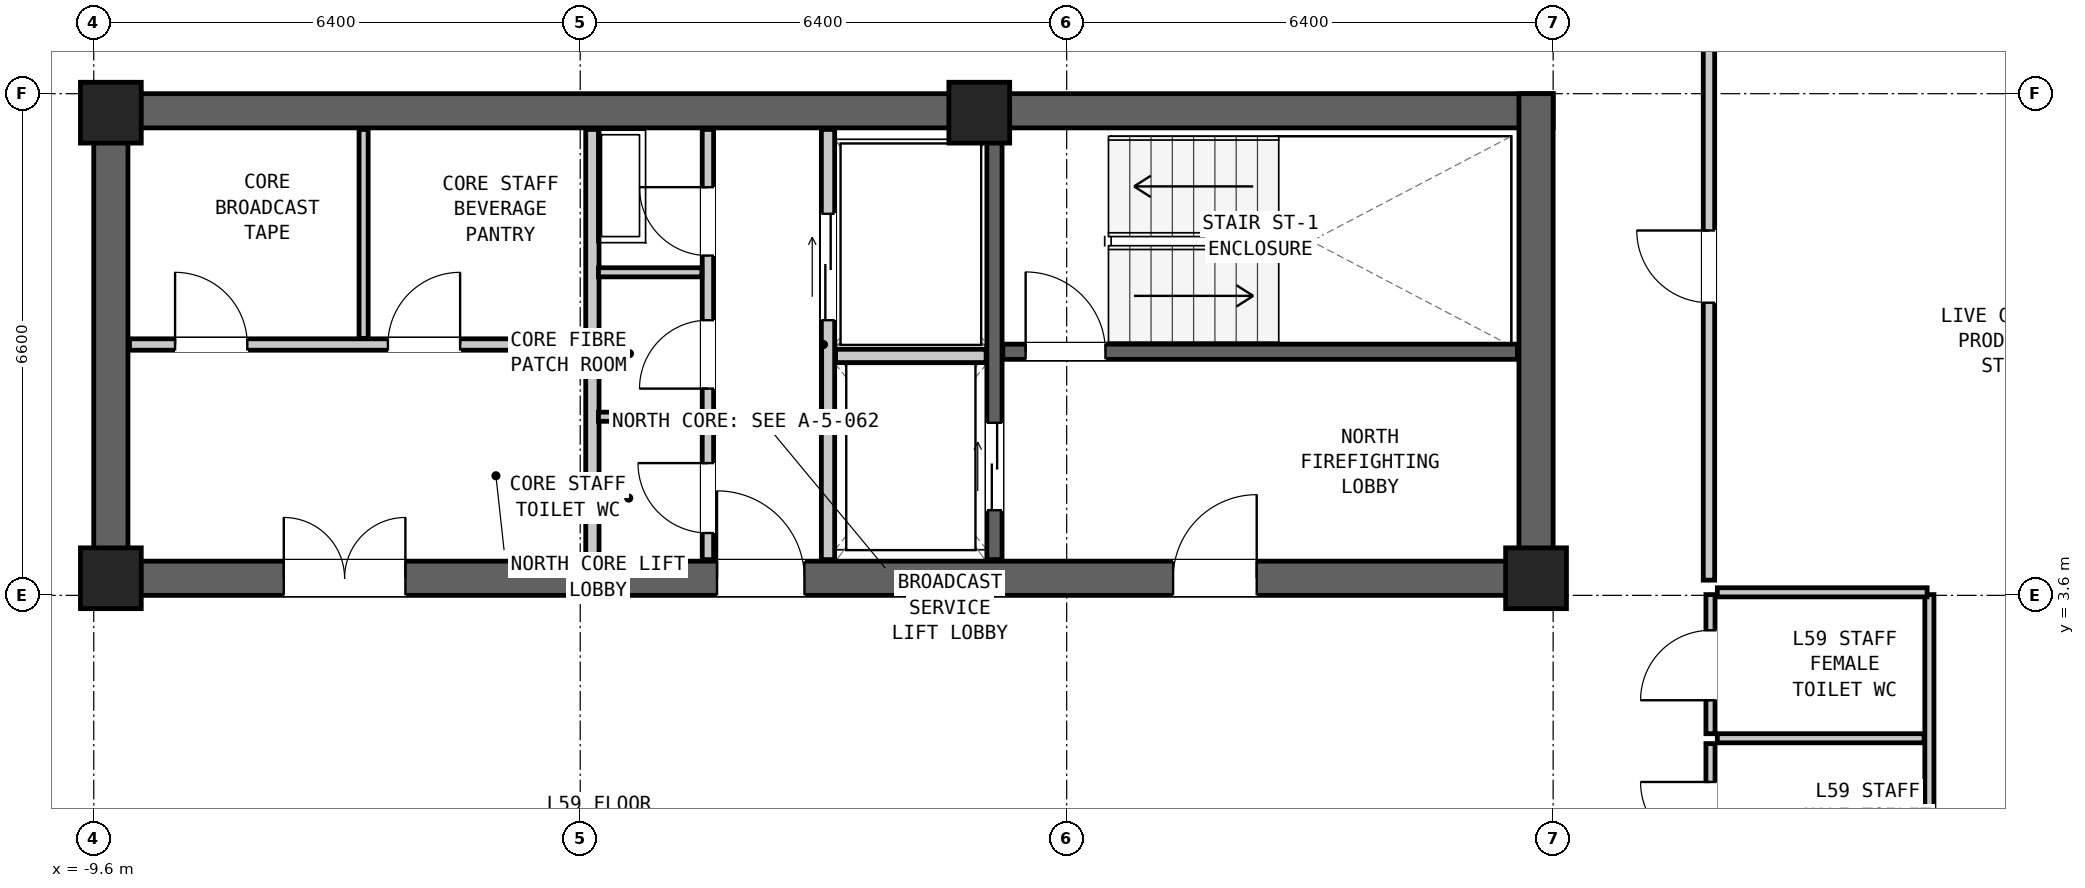
"""IFC4 building model, lengths in metres.
Left out: names, types, materials, properties, quantities, classifications, styles, units other than length and angle.
Written with IfcOpenShell. Run it as: python <this file> out.ifc"""

import sys

from ifc_helpers import new_model, si_unit, direction, frame, frame_2d, origin, origin_2d, place, context, subcontext, project, spatial, rectangle, extrude, element, fill, save


model = new_model("IFC4")
c1 = context("Model", 3, precision=1e-05, world=origin(), true_north=direction((0.0, 1.0)))
c2 = subcontext(c1, "Body", "Model", "MODEL_VIEW")
j1 = project(units=[si_unit("LENGTHUNIT", "METRE"), si_unit("PLANEANGLEUNIT", "RADIAN")], contexts=[c1])
p1 = place(None, origin())
s1 = spatial("IfcSite", under=j1, at=p1, CompositionType="ELEMENT")
p2 = place(p1, origin())
s2 = spatial("IfcBuilding", under=s1, at=p2, CompositionType="ELEMENT")
p3 = place(p2, frame((0.0, 0.0, 202.55)))
s3 = spatial("IfcBuildingStorey", under=s2, at=p3, CompositionType="ELEMENT", Elevation=202.55)
p4 = place(p3, frame((-9.6, 9.975, 0.0), z_axis=(0.0, 0.0, 1.0), x_axis=(1.0, 0.0, 0.0)))
e1 = element("IfcWall", 1, at=p4, inside=s3, PredefinedType="SHEAR", context=c2, shape_type="SweptSolid", body=[
    extrude(rectangle(XDim=19.2, YDim=0.45, at=frame_2d((9.6, 0.0))), origin(), (0.0, 0.0, 1.0), 3.05),
])
p5 = place(p3, frame((-9.6, 3.825, 0.0), z_axis=(0.0, 0.0, 1.0), x_axis=(1.0, 0.0, 0.0)))
e2 = element("IfcWall", 2, at=p5, inside=s3, PredefinedType="SHEAR", context=c2, shape_type="SweptSolid", body=[
    extrude(rectangle(XDim=19.2, YDim=0.45, at=frame_2d((9.6, 0.0))), origin(), (0.0, 0.0, 1.0), 3.05),
])
p6 = place(p5, frame((14.2, 0.0, 0.0)))
e3 = element("IfcOpeningElement", 3, at=p6, cuts=e2, PredefinedType="OPENING", context=c2, shape_type="SweptSolid", body=[
    extrude(rectangle(XDim=1.1, YDim=2.08, at=frame_2d((0.55, 1.04))), frame((0.0, 0.237, 0.0), z_axis=(0.0, -1.0, 0.0), x_axis=(1.0, 0.0, 0.0)), (0.0, 0.0, 1.0), 0.474),
])
p7 = place(p5, frame((8.2, 0.0, 0.0)))
e4 = element("IfcOpeningElement", 4, at=p7, cuts=e2, PredefinedType="OPENING", context=c2, shape_type="SweptSolid", body=[
    extrude(rectangle(XDim=1.15, YDim=2.1, at=frame_2d((0.575, 1.05))), frame((0.0, 0.237, 0.0), z_axis=(0.0, -1.0, 0.0), x_axis=(1.0, 0.0, 0.0)), (0.0, 0.0, 1.0), 0.474),
])
p8 = place(p5, frame((2.5, 0.0, 0.0)))
e5 = element("IfcOpeningElement", 5, at=p8, cuts=e2, PredefinedType="OPENING", context=c2, shape_type="SweptSolid", body=[
    extrude(rectangle(XDim=1.6, YDim=2.12, at=frame_2d((0.8, 1.06))), frame((0.0, 0.237, 0.0), z_axis=(0.0, -1.0, 0.0), x_axis=(1.0, 0.0, 0.0)), (0.0, 0.0, 1.0), 0.474),
])
for number, where, z_axis, x_axis in (
    (6, (-9.375, 3.6, 0.0), (0.0, 0.0, 1.0), (0.0, 1.0, 0.0)),
    (7, (9.375, 3.6, 0.0), (0.0, 0.0, 1.0), (0.0, 1.0, 0.0)),
):
    element("IfcWall", number, at=place(p3, frame(where, z_axis=z_axis, x_axis=x_axis)), inside=s3, PredefinedType="SHEAR", context=c2, shape_type="SweptSolid", body=[
        extrude(rectangle(XDim=6.6, YDim=0.45, at=frame_2d((3.3, 0.0))), origin(), (0.0, 0.0, 1.0), 3.05),
    ])
for number, where, z_axis, x_axis in (
    (8, (-9.375, 9.95, 0.0), (0.0, 0.0, 1.0), (1.0, 0.0, 0.0)),
    (9, (2.05, 9.95, 0.0), (0.0, 0.0, 1.0), (1.0, 0.0, 0.0)),
    (10, (-9.375, 3.825, 0.0), (0.0, 0.0, 1.0), (1.0, 0.0, 0.0)),
    (11, (9.375, 3.825, 0.0), (0.0, 0.0, 1.0), (1.0, 0.0, 0.0)),
):
    element("IfcColumn", number, at=place(p3, frame(where, z_axis=z_axis, x_axis=x_axis)), inside=s3, PredefinedType="COLUMN", context=c2, shape_type="SweptSolid", body=[
        extrude(rectangle(XDim=0.8, YDim=0.8, at=origin_2d()), origin(), (0.0, 0.0, 1.0), 3.05),
    ])
p9 = place(p3, frame((2.36, 6.805, 0.0), z_axis=(0.0, 0.0, 1.0), x_axis=(1.0, 0.0, 0.0)))
e12 = element("IfcWall", 12, at=p9, inside=s3, PredefinedType="SHEAR", context=c2, shape_type="SweptSolid", body=[
    extrude(rectangle(XDim=6.77, YDim=0.2, at=frame_2d((3.385, 0.0))), origin(), (0.0, 0.0, 1.0), 2.86),
])
p10 = place(p9, frame((0.3, 0.0, 0.0)))
e13 = element("IfcOpeningElement", 13, at=p10, cuts=e12, PredefinedType="OPENING", context=c2, shape_type="SweptSolid", body=[
    extrude(rectangle(XDim=1.05, YDim=2.08, at=frame_2d((0.525, 1.04))), frame((0.0, 0.112, 0.0), z_axis=(0.0, -1.0, 0.0), x_axis=(1.0, 0.0, 0.0)), (0.0, 0.0, 1.0), 0.224),
])
p11 = place(p3, frame((2.25, 4.07, 0.0), z_axis=(0.0, 0.0, 1.0), x_axis=(0.0, 1.0, 0.0)))
e14 = element("IfcWall", 14, at=p11, inside=s3, PredefinedType="SHEAR", context=c2, shape_type="SweptSolid", body=[
    extrude(rectangle(XDim=5.66, YDim=0.2, at=frame_2d((2.83, 0.0))), origin(), (0.0, 0.0, 1.0), 2.86),
])
p12 = place(p11, frame((0.65, 0.0, 0.0)))
e15 = element("IfcOpeningElement", 15, at=p12, cuts=e14, PredefinedType="OPENING", context=c2, shape_type="SweptSolid", body=[
    extrude(rectangle(XDim=1.15, YDim=2.08, at=frame_2d((0.575, 1.04))), frame((0.0, 0.112, 0.0), z_axis=(0.0, -1.0, 0.0), x_axis=(1.0, 0.0, 0.0)), (0.0, 0.0, 1.0), 0.224),
])
p13 = place(p3, frame((0.06, 4.07, 0.0), z_axis=(0.0, 0.0, 1.0), x_axis=(0.0, 1.0, 0.0)))
e16 = element("IfcWall", 16, at=p13, inside=s3, PredefinedType="PARTITIONING", context=c2, shape_type="SweptSolid", body=[
    extrude(rectangle(XDim=5.66, YDim=0.175, at=frame_2d((2.83, 0.0))), origin(), (0.0, 0.0, 1.0), 2.86),
])
p14 = place(p13, frame((3.15, 0.0, 0.0)))
e17 = element("IfcOpeningElement", 17, at=p14, cuts=e16, PredefinedType="OPENING", context=c2, shape_type="SweptSolid", body=[
    extrude(rectangle(XDim=1.4, YDim=2.12, at=frame_2d((0.7, 1.06))), frame((0.0, 0.1, 0.0), z_axis=(0.0, -1.0, 0.0), x_axis=(1.0, 0.0, 0.0)), (0.0, 0.0, 1.0), 0.199),
])
p15 = place(p3, frame((0.16, 6.75, 0.0), z_axis=(0.0, 0.0, 1.0), x_axis=(1.0, 0.0, 0.0)))
e18 = element("IfcWall", 18, at=p15, inside=s3, PredefinedType="PARTITIONING", context=c2, shape_type="SweptSolid", body=[
    extrude(rectangle(XDim=1.98, YDim=0.175, at=frame_2d((0.99, 0.0))), origin(), (0.0, 0.0, 1.0), 2.86),
])
p16 = place(p3, frame((-3.04, 4.07, 0.0), z_axis=(0.0, 0.0, 1.0), x_axis=(0.0, 1.0, 0.0)))
e19 = element("IfcWall", 19, at=p16, inside=s3, PredefinedType="PARTITIONING", context=c2, shape_type="SweptSolid", body=[
    extrude(rectangle(XDim=5.66, YDim=0.175, at=frame_2d((2.83, 0.0))), origin(), (0.0, 0.0, 1.0), 2.86),
])
p17 = place(p3, frame((-1.52, 4.07, 0.0), z_axis=(0.0, 0.0, 1.0), x_axis=(0.0, 1.0, 0.0)))
e20 = element("IfcWall", 20, at=p17, inside=s3, PredefinedType="PARTITIONING", context=c2, shape_type="SweptSolid", body=[
    extrude(rectangle(XDim=5.66, YDim=0.15, at=frame_2d((2.83, 0.0))), origin(), (0.0, 0.0, 1.0), 2.86),
])
p18 = place(p17, frame((4.0, 0.0, 0.0)))
e21 = element("IfcOpeningElement", 21, at=p18, cuts=e20, PredefinedType="OPENING", context=c2, shape_type="SweptSolid", body=[
    extrude(rectangle(XDim=0.9, YDim=2.05, at=frame_2d((0.45, 1.025))), frame((0.0, 0.087, 0.0), z_axis=(0.0, -1.0, 0.0), x_axis=(1.0, 0.0, 0.0)), (0.0, 0.0, 1.0), 0.174),
])
p19 = place(p17, frame((2.25, 0.0, 0.0)))
e22 = element("IfcOpeningElement", 22, at=p19, cuts=e20, PredefinedType="OPENING", context=c2, shape_type="SweptSolid", body=[
    extrude(rectangle(XDim=0.9, YDim=2.05, at=frame_2d((0.45, 1.025))), frame((0.0, 0.087, 0.0), z_axis=(0.0, -1.0, 0.0), x_axis=(1.0, 0.0, 0.0)), (0.0, 0.0, 1.0), 0.174),
])
p20 = place(p17, frame((0.35, 0.0, 0.0)))
e23 = element("IfcOpeningElement", 23, at=p20, cuts=e20, PredefinedType="OPENING", context=c2, shape_type="SweptSolid", body=[
    extrude(rectangle(XDim=0.92, YDim=2.1, at=frame_2d((0.46, 1.05))), frame((0.0, 0.087, 0.0), z_axis=(0.0, -1.0, 0.0), x_axis=(1.0, 0.0, 0.0)), (0.0, 0.0, 1.0), 0.174),
])
for number, where, z_axis, x_axis in (
    (24, (-2.96, 5.95, 0.0), (0.0, 0.0, 1.0), (1.0, 0.0, 0.0)),
    (25, (-2.96, 7.85, 0.0), (0.0, 0.0, 1.0), (1.0, 0.0, 0.0)),
):
    element("IfcWall", number, at=place(p3, frame(where, z_axis=z_axis, x_axis=x_axis)), inside=s3, PredefinedType="PARTITIONING", context=c2, shape_type="SweptSolid", body=[
        extrude(rectangle(XDim=1.36, YDim=0.12, at=frame_2d((0.68, 0.0))), origin(), (0.0, 0.0, 1.0), 2.86),
    ])
p21 = place(p3, frame((-9.13, 6.9, 0.0), z_axis=(0.0, 0.0, 1.0), x_axis=(1.0, 0.0, 0.0)))
e26 = element("IfcWall", 26, at=p21, inside=s3, PredefinedType="PARTITIONING", context=c2, shape_type="SweptSolid", body=[
    extrude(rectangle(XDim=6.01, YDim=0.15, at=frame_2d((3.005, 0.0))), origin(), (0.0, 0.0, 1.0), 2.86),
])
p22 = place(p21, frame((0.6, 0.0, 0.0)))
e27 = element("IfcOpeningElement", 27, at=p22, cuts=e26, PredefinedType="OPENING", context=c2, shape_type="SweptSolid", body=[
    extrude(rectangle(XDim=0.95, YDim=2.1, at=frame_2d((0.475, 1.05))), frame((0.0, 0.087, 0.0), z_axis=(0.0, -1.0, 0.0), x_axis=(1.0, 0.0, 0.0)), (0.0, 0.0, 1.0), 0.174),
])
p23 = place(p21, frame((3.4, 0.0, 0.0)))
e28 = element("IfcOpeningElement", 28, at=p23, cuts=e26, PredefinedType="OPENING", context=c2, shape_type="SweptSolid", body=[
    extrude(rectangle(XDim=0.95, YDim=2.1, at=frame_2d((0.475, 1.05))), frame((0.0, 0.087, 0.0), z_axis=(0.0, -1.0, 0.0), x_axis=(1.0, 0.0, 0.0)), (0.0, 0.0, 1.0), 0.174),
])
p24 = place(p3, frame((-6.05, 6.98, 0.0), z_axis=(0.0, 0.0, 1.0), x_axis=(0.0, 1.0, 0.0)))
e29 = element("IfcWall", 29, at=p24, inside=s3, PredefinedType="PARTITIONING", context=c2, shape_type="SweptSolid", body=[
    extrude(rectangle(XDim=2.75, YDim=0.12, at=frame_2d((1.375, 0.0))), origin(), (0.0, 0.0, 1.0), 2.86),
])
p25 = place(p3, frame((11.67, -0.25, 0.0), z_axis=(0.0, 0.0, 1.0), x_axis=(0.0, 1.0, 0.0)))
e30 = element("IfcWall", 30, at=p25, inside=s3, PredefinedType="PARTITIONING", context=c2, shape_type="SweptSolid", body=[
    extrude(rectangle(XDim=1.9, YDim=0.12, at=frame_2d((0.95, 0.0))), origin(), (0.0, 0.0, 1.0), 2.86),
])
p26 = place(p25, frame((0.475, 0.0, 0.0)))
e31 = element("IfcOpeningElement", 31, at=p26, cuts=e30, PredefinedType="OPENING", context=c2, shape_type="SweptSolid", body=[
    extrude(rectangle(XDim=0.92, YDim=2.1, at=frame_2d((0.46, 1.05))), frame((0.0, 0.072, 0.0), z_axis=(0.0, -1.0, 0.0), x_axis=(1.0, 0.0, 0.0)), (0.0, 0.0, 1.0), 0.144),
])
p27 = place(p3, frame((11.67, 1.78, 0.0), z_axis=(0.0, 0.0, 1.0), x_axis=(0.0, 1.0, 0.0)))
e32 = element("IfcWall", 32, at=p27, inside=s3, PredefinedType="PARTITIONING", context=c2, shape_type="SweptSolid", body=[
    extrude(rectangle(XDim=1.83, YDim=0.12, at=frame_2d((0.915, 0.0))), origin(), (0.0, 0.0, 1.0), 2.86),
])
p28 = place(p27, frame((0.44, 0.0, 0.0)))
e33 = element("IfcOpeningElement", 33, at=p28, cuts=e32, PredefinedType="OPENING", context=c2, shape_type="SweptSolid", body=[
    extrude(rectangle(XDim=0.92, YDim=2.1, at=frame_2d((0.46, 1.05))), frame((0.0, 0.072, 0.0), z_axis=(0.0, -1.0, 0.0), x_axis=(1.0, 0.0, 0.0)), (0.0, 0.0, 1.0), 0.144),
])
p29 = place(p3, frame((14.55, -2.32, 0.0), z_axis=(0.0, 0.0, 1.0), x_axis=(0.0, 1.0, 0.0)))
e34 = element("IfcWall", 34, at=p29, inside=s3, PredefinedType="PARTITIONING", context=c2, shape_type="SweptSolid", body=[
    extrude(rectangle(XDim=5.93, YDim=0.12, at=frame_2d((2.965, 0.0))), origin(), (0.0, 0.0, 1.0), 2.86),
])
p30 = place(p3, frame((11.76, 3.64, 0.0), z_axis=(0.0, 0.0, 1.0), x_axis=(1.0, 0.0, 0.0)))
e35 = element("IfcWall", 35, at=p30, inside=s3, PredefinedType="PARTITIONING", context=c2, shape_type="SweptSolid", body=[
    extrude(rectangle(XDim=2.76, YDim=0.12, at=frame_2d((1.38, 0.0))), origin(), (0.0, 0.0, 1.0), 1.981),
])
p31 = place(p3, frame((11.76, 1.72, 0.0), z_axis=(0.0, 0.0, 1.0), x_axis=(1.0, 0.0, 0.0)))
e36 = element("IfcWall", 36, at=p31, inside=s3, PredefinedType="PARTITIONING", context=c2, shape_type="SweptSolid", body=[
    extrude(rectangle(XDim=2.72, YDim=0.12, at=frame_2d((1.36, 0.0))), origin(), (0.0, 0.0, 1.0), 2.86),
])
p32 = place(p3, frame((11.65, 3.8, 0.0), z_axis=(0.0, 0.0, 1.0), x_axis=(0.0, 1.0, 0.0)))
e37 = element("IfcWall", 37, at=p32, inside=s3, PredefinedType="PARTITIONING", context=c2, shape_type="SweptSolid", body=[
    extrude(rectangle(XDim=8.25, YDim=0.15, at=frame_2d((4.125, 0.0))), origin(), (0.0, 0.0, 1.0), 2.86),
])
p33 = place(p32, frame((3.65, 0.0, 0.0)))
e38 = element("IfcOpeningElement", 38, at=p33, cuts=e37, PredefinedType="OPENING", context=c2, shape_type="SweptSolid", body=[
    extrude(rectangle(XDim=0.95, YDim=2.1, at=frame_2d((0.475, 1.05))), frame((0.0, 0.087, 0.0), z_axis=(0.0, -1.0, 0.0), x_axis=(1.0, 0.0, 0.0)), (0.0, 0.0, 1.0), 0.174),
])
p34 = place(p10, origin())
e39 = element("IfcDoor", 39, at=p34, inside=s3, OperationType="SINGLE_SWING_LEFT", PredefinedType="DOOR", context=c2, shape_type="SweptSolid", body=[
    extrude(rectangle(XDim=1.05, YDim=2.08, at=frame_2d((0.525, 1.04))), frame((0.0, 0.025, 0.0), z_axis=(0.0, -1.0, 0.0), x_axis=(1.0, 0.0, 0.0)), (0.0, 0.0, 1.0), 0.05),
])
fill(e13, e39)
p35 = place(p6, origin())
e40 = element("IfcDoor", 40, at=p35, inside=s3, OperationType="SINGLE_SWING_RIGHT", PredefinedType="DOOR", context=c2, shape_type="SweptSolid", body=[
    extrude(rectangle(XDim=1.1, YDim=2.08, at=frame_2d((0.55, 1.04))), frame((0.0, 0.025, 0.0), z_axis=(0.0, -1.0, 0.0), x_axis=(1.0, 0.0, 0.0)), (0.0, 0.0, 1.0), 0.05),
])
fill(e3, e40)
p36 = place(p12, origin())
e41 = element("IfcDoor", 41, at=p36, inside=s3, OperationType="DOUBLE_DOOR_SLIDING", PredefinedType="DOOR", context=c2, shape_type="SweptSolid", body=[
    extrude(rectangle(XDim=1.15, YDim=2.08, at=frame_2d((0.575, 1.04))), frame((0.0, 0.025, 0.0), z_axis=(0.0, -1.0, 0.0), x_axis=(1.0, 0.0, 0.0)), (0.0, 0.0, 1.0), 0.05),
])
fill(e15, e41)
p37 = place(p14, origin())
e42 = element("IfcDoor", 42, at=p37, inside=s3, OperationType="DOUBLE_DOOR_SLIDING", PredefinedType="DOOR", context=c2, shape_type="SweptSolid", body=[
    extrude(rectangle(XDim=1.4, YDim=2.12, at=frame_2d((0.7, 1.06))), frame((0.0, 0.025, 0.0), z_axis=(0.0, -1.0, 0.0), x_axis=(1.0, 0.0, 0.0)), (0.0, 0.0, 1.0), 0.05),
])
fill(e17, e42)
p38 = place(p7, origin())
e43 = element("IfcDoor", 43, at=p38, inside=s3, OperationType="SINGLE_SWING_LEFT", PredefinedType="DOOR", context=c2, shape_type="SweptSolid", body=[
    extrude(rectangle(XDim=1.15, YDim=2.1, at=frame_2d((0.575, 1.05))), frame((0.0, 0.025, 0.0), z_axis=(0.0, -1.0, 0.0), x_axis=(1.0, 0.0, 0.0)), (0.0, 0.0, 1.0), 0.05),
])
fill(e4, e43)
p39 = place(p18, origin())
e44 = element("IfcDoor", 44, at=p39, inside=s3, OperationType="SINGLE_SWING_RIGHT", PredefinedType="DOOR", context=c2, shape_type="SweptSolid", body=[
    extrude(rectangle(XDim=0.9, YDim=2.05, at=frame_2d((0.45, 1.025))), frame((0.0, 0.025, 0.0), z_axis=(0.0, -1.0, 0.0), x_axis=(1.0, 0.0, 0.0)), (0.0, 0.0, 1.0), 0.05),
])
fill(e21, e44)
p40 = place(p19, origin())
e45 = element("IfcDoor", 45, at=p40, inside=s3, OperationType="SINGLE_SWING_LEFT", PredefinedType="DOOR", context=c2, shape_type="SweptSolid", body=[
    extrude(rectangle(XDim=0.9, YDim=2.05, at=frame_2d((0.45, 1.025))), frame((0.0, 0.025, 0.0), z_axis=(0.0, -1.0, 0.0), x_axis=(1.0, 0.0, 0.0)), (0.0, 0.0, 1.0), 0.05),
])
fill(e22, e45)
p41 = place(p20, origin())
e46 = element("IfcDoor", 46, at=p41, inside=s3, OperationType="SINGLE_SWING_RIGHT", PredefinedType="DOOR", context=c2, shape_type="SweptSolid", body=[
    extrude(rectangle(XDim=0.92, YDim=2.1, at=frame_2d((0.46, 1.05))), frame((0.0, 0.025, 0.0), z_axis=(0.0, -1.0, 0.0), x_axis=(1.0, 0.0, 0.0)), (0.0, 0.0, 1.0), 0.05),
])
fill(e23, e46)
p42 = place(p8, origin())
e47 = element("IfcDoor", 47, at=p42, inside=s3, OperationType="DOUBLE_DOOR_SINGLE_SWING", PredefinedType="DOOR", context=c2, shape_type="SweptSolid", body=[
    extrude(rectangle(XDim=1.6, YDim=2.12, at=frame_2d((0.8, 1.06))), frame((0.0, 0.025, 0.0), z_axis=(0.0, -1.0, 0.0), x_axis=(1.0, 0.0, 0.0)), (0.0, 0.0, 1.0), 0.05),
])
fill(e5, e47)
p43 = place(p22, origin())
e48 = element("IfcDoor", 48, at=p43, inside=s3, OperationType="SINGLE_SWING_LEFT", PredefinedType="DOOR", context=c2, shape_type="SweptSolid", body=[
    extrude(rectangle(XDim=0.95, YDim=2.1, at=frame_2d((0.475, 1.05))), frame((0.0, 0.025, 0.0), z_axis=(0.0, -1.0, 0.0), x_axis=(1.0, 0.0, 0.0)), (0.0, 0.0, 1.0), 0.05),
])
fill(e27, e48)
p44 = place(p23, origin())
e49 = element("IfcDoor", 49, at=p44, inside=s3, OperationType="SINGLE_SWING_RIGHT", PredefinedType="DOOR", context=c2, shape_type="SweptSolid", body=[
    extrude(rectangle(XDim=0.95, YDim=2.1, at=frame_2d((0.475, 1.05))), frame((0.0, 0.025, 0.0), z_axis=(0.0, -1.0, 0.0), x_axis=(1.0, 0.0, 0.0)), (0.0, 0.0, 1.0), 0.05),
])
fill(e28, e49)
p45 = place(p26, origin())
e50 = element("IfcDoor", 50, at=p45, inside=s3, OperationType="SINGLE_SWING_RIGHT", PredefinedType="DOOR", context=c2, shape_type="SweptSolid", body=[
    extrude(rectangle(XDim=0.92, YDim=2.1, at=frame_2d((0.46, 1.05))), frame((0.0, 0.025, 0.0), z_axis=(0.0, -1.0, 0.0), x_axis=(1.0, 0.0, 0.0)), (0.0, 0.0, 1.0), 0.05),
])
fill(e31, e50)
p46 = place(p28, origin())
e51 = element("IfcDoor", 51, at=p46, inside=s3, OperationType="SINGLE_SWING_LEFT", PredefinedType="DOOR", context=c2, shape_type="SweptSolid", body=[
    extrude(rectangle(XDim=0.92, YDim=2.1, at=frame_2d((0.46, 1.05))), frame((0.0, 0.025, 0.0), z_axis=(0.0, -1.0, 0.0), x_axis=(1.0, 0.0, 0.0)), (0.0, 0.0, 1.0), 0.05),
])
fill(e33, e51)
p47 = place(p33, origin())
e52 = element("IfcDoor", 52, at=p47, inside=s3, OperationType="SINGLE_SWING_RIGHT", PredefinedType="DOOR", context=c2, shape_type="SweptSolid", body=[
    extrude(rectangle(XDim=0.95, YDim=2.1, at=frame_2d((0.475, 1.05))), frame((0.0, 0.025, 0.0), z_axis=(0.0, -1.0, 0.0), x_axis=(1.0, 0.0, 0.0)), (0.0, 0.0, 1.0), 0.05),
])
fill(e38, e52)
save(model, sys.argv[1])
